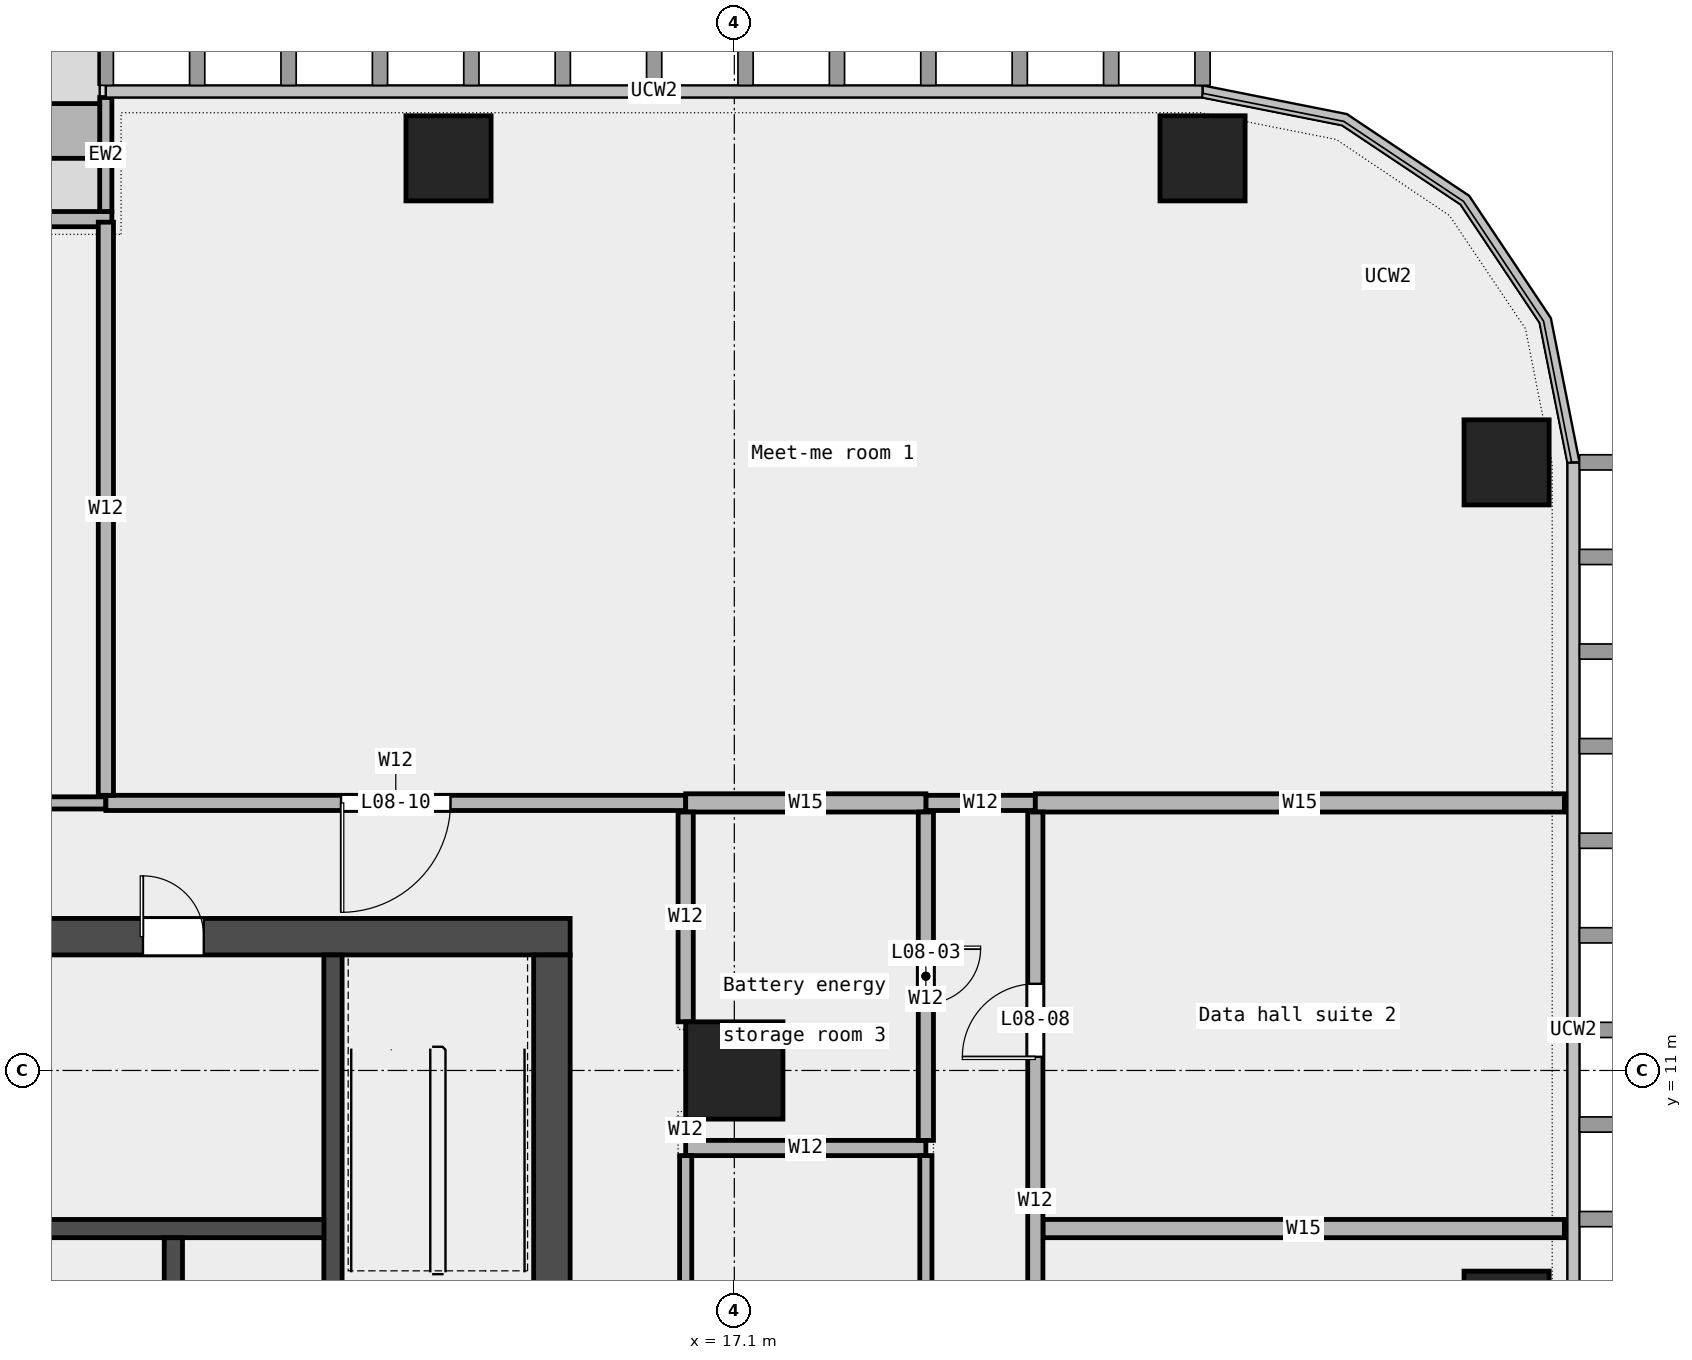
"""IFC4 building model, lengths in metres.
Left out: names, types, materials, properties, quantities, classifications, styles, units other than length and angle.
Written with IfcOpenShell. Run it as: python <this file> out.ifc"""

import sys

from ifc_helpers import new_model, si_unit, direction, frame, frame_2d, origin, origin_2d, place, context, subcontext, project, spatial, rectangle, extrude, element, fill, save


model = new_model("IFC4")
c1 = context("Model", 3, precision=1e-05, world=origin(), true_north=direction((0.0, 1.0)))
c2 = subcontext(c1, "Body", "Model", "MODEL_VIEW")
j1 = project(units=[si_unit("LENGTHUNIT", "METRE"), si_unit("PLANEANGLEUNIT", "RADIAN")], contexts=[c1])
p1 = place(None, origin())
s1 = spatial("IfcSite", under=j1, at=p1, CompositionType="ELEMENT")
p2 = place(p1, origin())
s2 = spatial("IfcBuilding", under=s1, at=p2, CompositionType="ELEMENT")
p3 = place(p2, frame((0.0, 0.0, 45.4)))
s3 = spatial("IfcBuildingStorey", under=s2, at=p3, CompositionType="ELEMENT", Elevation=45.4)
for number, where, z_axis, x_axis in (
    (1, (29.8, 7.0, 0.0), (0.0, 0.0, 1.0), (1.0, 0.0, 0.0)),
    (2, (29.8, 21.0, 0.0), (0.0, 0.0, 1.0), (1.0, 0.0, 0.0)),
    (3, (24.8, 26.0, 0.0), (0.0, 0.0, 1.0), (1.0, 0.0, 0.0)),
    (4, (12.4, 26.0, 0.0), (0.0, 0.0, 1.0), (1.0, 0.0, 0.0)),
):
    element("IfcColumn", number, at=place(p3, frame(where, z_axis=z_axis, x_axis=x_axis)), inside=s3, PredefinedType="COLUMN", context=c2, shape_type="SweptSolid", body=[
        extrude(rectangle(XDim=1.4, YDim=1.4, at=origin_2d()), origin(), (0.0, 0.0, 1.0), 4.35),
    ])
p4 = place(p3, frame((17.1, 11.0, 0.0), z_axis=(0.0, 0.0, 1.0), x_axis=(1.0, 0.0, 0.0)))
e5 = element("IfcColumn", 5, at=p4, inside=s3, PredefinedType="COLUMN", context=c2, shape_type="SweptSolid", body=[
    extrude(rectangle(XDim=1.6, YDim=1.6, at=origin_2d()), origin(), (0.0, 0.0, 1.0), 4.35),
])
p5 = place(p3, frame((6.864, 25.0, 0.0), z_axis=(0.0, 0.0, 1.0), x_axis=(-1.0, 0.0, 0.0)))
e6 = element("IfcWall", 6, at=p5, inside=s3, PredefinedType="STANDARD", context=c2, shape_type="SweptSolid", body=[
    extrude(rectangle(XDim=13.727, YDim=0.25, at=frame_2d((6.864, 0.0))), origin(), (0.0, 0.0, 1.0), 4.35),
])
p6 = place(p5, frame((1.75, 0.0, 0.45)))
e7 = element("IfcOpeningElement", 7, at=p6, cuts=e6, PredefinedType="OPENING", context=c2, shape_type="SweptSolid", body=[
    extrude(rectangle(XDim=1.5, YDim=3.0, at=frame_2d((0.75, 1.5))), frame((0.0, 0.137, 0.0), z_axis=(0.0, -1.0, 0.0), x_axis=(1.0, 0.0, 0.0)), (0.0, 0.0, 1.0), 0.274),
])
p7 = place(p5, frame((4.0, 0.0, 0.0)))
e8 = element("IfcOpeningElement", 8, at=p7, cuts=e6, PredefinedType="OPENING", context=c2, shape_type="SweptSolid", body=[
    extrude(rectangle(XDim=1.8, YDim=2.4, at=frame_2d((0.9, 1.2))), frame((0.0, 0.137, 0.0), z_axis=(0.0, -1.0, 0.0), x_axis=(1.0, 0.0, 0.0)), (0.0, 0.0, 1.0), 0.274),
])
p8 = place(p5, frame((10.5, 0.0, 0.45)))
e9 = element("IfcOpeningElement", 9, at=p8, cuts=e6, PredefinedType="OPENING", context=c2, shape_type="SweptSolid", body=[
    extrude(rectangle(XDim=1.5, YDim=3.0, at=frame_2d((0.75, 1.5))), frame((0.0, 0.137, 0.0), z_axis=(0.0, -1.0, 0.0), x_axis=(1.0, 0.0, 0.0)), (0.0, 0.0, 1.0), 0.274),
])
p9 = place(p3, frame((6.764, 27.0, 0.0), z_axis=(0.0, 0.0, 1.0), x_axis=(0.0, -1.0, 0.0)))
e10 = element("IfcWall", 10, at=p9, inside=s3, PredefinedType="STANDARD", context=c2, shape_type="SweptSolid", body=[
    extrude(rectangle(XDim=1.875, YDim=0.2, at=frame_2d((0.938, 0.0))), origin(), (0.0, 0.0, 1.0), 4.35),
])
p10 = place(p3, frame((6.664, 26.45, 0.0), z_axis=(0.0, 0.0, 1.0), x_axis=(-1.0, 0.0, 0.0)))
e11 = element("IfcWall", 11, at=p10, inside=s3, PredefinedType="STANDARD", context=c2, shape_type="SweptSolid", body=[
    extrude(rectangle(XDim=3.6, YDim=0.9, at=frame_2d((1.8, 0.0))), origin(), (0.0, 0.0, 1.0), 0.7),
])
p11 = place(p3, frame((22.175, 8.4, 0.0), z_axis=(0.0, 0.0, 1.0), x_axis=(1.0, 0.0, 0.0)))
e12 = element("IfcWall", 12, at=p11, inside=s3, PredefinedType="PARTITIONING", context=c2, shape_type="SweptSolid", body=[
    extrude(rectangle(XDim=8.575, YDim=0.3, at=frame_2d((4.288, 0.0))), origin(), (0.0, 0.0, 1.0), 4.35),
])
p12 = place(p3, frame((16.3, 9.725, 0.0), z_axis=(0.0, 0.0, 1.0), x_axis=(1.0, 0.0, 0.0)))
e13 = element("IfcWall", 13, at=p12, inside=s3, PredefinedType="PARTITIONING", context=c2, shape_type="SweptSolid", body=[
    extrude(rectangle(XDim=3.95, YDim=0.25, at=frame_2d((1.975, 0.0))), origin(), (0.0, 0.0, 1.0), 4.35),
])
p13 = place(p3, frame((-6.765, 15.4, 0.0), z_axis=(0.0, 0.0, 1.0), x_axis=(1.0, 0.0, 0.0)))
e14 = element("IfcWall", 14, at=p13, inside=s3, PredefinedType="PARTITIONING", context=c2, shape_type="SweptSolid", body=[
    extrude(rectangle(XDim=13.53, YDim=0.2, at=frame_2d((6.765, 0.0))), origin(), (0.0, 0.0, 1.0), 4.35),
])
p14 = place(p13, frame((6.015, 0.0, 0.0)))
e15 = element("IfcOpeningElement", 15, at=p14, cuts=e14, PredefinedType="OPENING", context=c2, shape_type="SweptSolid", body=[
    extrude(rectangle(XDim=1.5, YDim=2.1, at=frame_2d((0.75, 1.05))), frame((0.0, 0.112, 0.0), z_axis=(0.0, -1.0, 0.0), x_axis=(1.0, 0.0, 0.0)), (0.0, 0.0, 1.0), 0.224),
])
p15 = place(p3, frame((6.765, 15.4, 0.0), z_axis=(0.0, 0.0, 1.0), x_axis=(1.0, 0.0, 0.0)))
e16 = element("IfcWall", 16, at=p15, inside=s3, PredefinedType="PARTITIONING", context=c2, shape_type="SweptSolid", body=[
    extrude(rectangle(XDim=9.535, YDim=0.25, at=frame_2d((4.768, 0.0))), origin(), (0.0, 0.0, 1.0), 4.35),
])
p16 = place(p15, frame((3.867, 0.0, 0.0)))
e17 = element("IfcOpeningElement", 17, at=p16, cuts=e16, PredefinedType="OPENING", context=c2, shape_type="SweptSolid", body=[
    extrude(rectangle(XDim=1.8, YDim=2.1, at=frame_2d((0.9, 1.05))), frame((0.0, 0.137, 0.0), z_axis=(0.0, -1.0, 0.0), x_axis=(1.0, 0.0, 0.0)), (0.0, 0.0, 1.0), 0.274),
])
p17 = place(p3, frame((20.25, 15.4, 0.0), z_axis=(0.0, 0.0, 1.0), x_axis=(1.0, 0.0, 0.0)))
e18 = element("IfcWall", 18, at=p17, inside=s3, PredefinedType="PARTITIONING", context=c2, shape_type="SweptSolid", body=[
    extrude(rectangle(XDim=1.8, YDim=0.25, at=frame_2d((0.9, 0.0))), origin(), (0.0, 0.0, 1.0), 4.35),
])
p18 = place(p3, frame((16.3, 15.4, 0.0), z_axis=(0.0, 0.0, 1.0), x_axis=(1.0, 0.0, 0.0)))
e19 = element("IfcWall", 19, at=p18, inside=s3, PredefinedType="PARTITIONING", context=c2, shape_type="SweptSolid", body=[
    extrude(rectangle(XDim=3.95, YDim=0.3, at=frame_2d((1.975, 0.0))), origin(), (0.0, 0.0, 1.0), 4.35),
])
p19 = place(p3, frame((22.05, 15.4, 0.0), z_axis=(0.0, 0.0, 1.0), x_axis=(1.0, 0.0, 0.0)))
e20 = element("IfcWall", 20, at=p19, inside=s3, PredefinedType="PARTITIONING", context=c2, shape_type="SweptSolid", body=[
    extrude(rectangle(XDim=8.7, YDim=0.3, at=frame_2d((4.35, 0.0))), origin(), (0.0, 0.0, 1.0), 4.35),
])
p20 = place(p3, frame((6.765, 15.525, 0.0), z_axis=(0.0, 0.0, 1.0), x_axis=(0.0, 1.0, 0.0)))
e21 = element("IfcWall", 21, at=p20, inside=s3, PredefinedType="PARTITIONING", context=c2, shape_type="SweptSolid", body=[
    extrude(rectangle(XDim=9.425, YDim=0.25, at=frame_2d((4.712, 0.0))), origin(), (0.0, 0.0, 1.0), 4.35),
])
p21 = place(p3, frame((16.3, 4.15, 0.0), z_axis=(0.0, 0.0, 1.0), x_axis=(0.0, 1.0, 0.0)))
e22 = element("IfcWall", 22, at=p21, inside=s3, PredefinedType="PARTITIONING", context=c2, shape_type="SweptSolid", body=[
    extrude(rectangle(XDim=5.45, YDim=0.2, at=frame_2d((2.725, 0.0))), origin(), (0.0, 0.0, 1.0), 4.35),
])
p22 = place(p3, frame((16.3, 9.85, 0.0), z_axis=(0.0, 0.0, 1.0), x_axis=(0.0, 1.0, 0.0)))
e23 = element("IfcWall", 23, at=p22, inside=s3, PredefinedType="PARTITIONING", context=c2, shape_type="SweptSolid", body=[
    extrude(rectangle(XDim=0.35, YDim=0.25, at=frame_2d((0.175, 0.0))), origin(), (0.0, 0.0, 1.0), 4.35),
])
p23 = place(p3, frame((16.3, 11.8, 0.0), z_axis=(0.0, 0.0, 1.0), x_axis=(0.0, 1.0, 0.0)))
e24 = element("IfcWall", 24, at=p23, inside=s3, PredefinedType="PARTITIONING", context=c2, shape_type="SweptSolid", body=[
    extrude(rectangle(XDim=3.45, YDim=0.25, at=frame_2d((1.725, 0.0))), origin(), (0.0, 0.0, 1.0), 4.35),
])
p24 = place(p3, frame((20.25, 4.15, 0.0), z_axis=(0.0, 0.0, 1.0), x_axis=(0.0, 1.0, 0.0)))
e25 = element("IfcWall", 25, at=p24, inside=s3, PredefinedType="PARTITIONING", context=c2, shape_type="SweptSolid", body=[
    extrude(rectangle(XDim=5.45, YDim=0.2, at=frame_2d((2.725, 0.0))), origin(), (0.0, 0.0, 1.0), 4.35),
])
p25 = place(p24, frame((2.275, 0.0, 0.0)))
e26 = element("IfcOpeningElement", 26, at=p25, cuts=e25, PredefinedType="OPENING", context=c2, shape_type="SweptSolid", body=[
    extrude(rectangle(XDim=0.9, YDim=2.1, at=frame_2d((0.45, 1.05))), frame((0.0, 0.112, 0.0), z_axis=(0.0, -1.0, 0.0), x_axis=(1.0, 0.0, 0.0)), (0.0, 0.0, 1.0), 0.224),
])
p26 = place(p3, frame((20.25, 9.85, 0.0), z_axis=(0.0, 0.0, 1.0), x_axis=(0.0, 1.0, 0.0)))
e27 = element("IfcWall", 27, at=p26, inside=s3, PredefinedType="PARTITIONING", context=c2, shape_type="SweptSolid", body=[
    extrude(rectangle(XDim=5.4, YDim=0.25, at=frame_2d((2.7, 0.0))), origin(), (0.0, 0.0, 1.0), 4.35),
])
p27 = place(p26, frame((2.25, 0.0, 0.0)))
e28 = element("IfcOpeningElement", 28, at=p27, cuts=e27, PredefinedType="OPENING", context=c2, shape_type="SweptSolid", body=[
    extrude(rectangle(XDim=0.9, YDim=2.1, at=frame_2d((0.45, 1.05))), frame((0.0, 0.137, 0.0), z_axis=(0.0, -1.0, 0.0), x_axis=(1.0, 0.0, 0.0)), (0.0, 0.0, 1.0), 0.274),
])
p28 = place(p3, frame((22.05, 2.46, 0.0), z_axis=(0.0, 0.0, 1.0), x_axis=(0.0, 1.0, 0.0)))
e29 = element("IfcWall", 29, at=p28, inside=s3, PredefinedType="PARTITIONING", context=c2, shape_type="SweptSolid", body=[
    extrude(rectangle(XDim=12.79, YDim=0.25, at=frame_2d((6.395, 0.0))), origin(), (0.0, 0.0, 1.0), 4.35),
])
p29 = place(p28, frame((2.37, 0.0, 0.0)))
e30 = element("IfcOpeningElement", 30, at=p29, cuts=e29, PredefinedType="OPENING", context=c2, shape_type="SweptSolid", body=[
    extrude(rectangle(XDim=1.2, YDim=2.1, at=frame_2d((0.6, 1.05))), frame((0.0, 0.137, 0.0), z_axis=(0.0, -1.0, 0.0), x_axis=(1.0, 0.0, 0.0)), (0.0, 0.0, 1.0), 0.274),
])
p30 = place(p28, frame((8.765, 0.0, 0.0)))
e31 = element("IfcOpeningElement", 31, at=p30, cuts=e29, PredefinedType="OPENING", context=c2, shape_type="SweptSolid", body=[
    extrude(rectangle(XDim=1.2, YDim=2.1, at=frame_2d((0.6, 1.05))), frame((0.0, 0.137, 0.0), z_axis=(0.0, -1.0, 0.0), x_axis=(1.0, 0.0, 0.0)), (0.0, 0.0, 1.0), 0.274),
])
p31 = place(p3, frame((-14.4, 13.2, 0.0), z_axis=(0.0, 0.0, 1.0), x_axis=(1.0, 0.0, 0.0)))
e32 = element("IfcWall", 32, at=p31, inside=s3, PredefinedType="SHEAR", context=c2, shape_type="SweptSolid", body=[
    extrude(rectangle(XDim=28.8, YDim=0.6, at=frame_2d((14.4, 0.0))), origin(), (0.0, 0.0, 1.0), 4.5),
])
p32 = place(p31, frame((4.9, 0.0, 0.0)))
e33 = element("IfcOpeningElement", 33, at=p32, cuts=e32, PredefinedType="OPENING", context=c2, shape_type="SweptSolid", body=[
    extrude(rectangle(XDim=1.0, YDim=2.1, at=frame_2d((0.5, 1.05))), frame((0.0, 0.312, 0.0), z_axis=(0.0, -1.0, 0.0), x_axis=(1.0, 0.0, 0.0)), (0.0, 0.0, 1.0), 0.624),
])
p33 = place(p31, frame((9.025, 0.0, 0.0)))
e34 = element("IfcOpeningElement", 34, at=p33, cuts=e32, PredefinedType="OPENING", context=c2, shape_type="SweptSolid", body=[
    extrude(rectangle(XDim=1.0, YDim=2.1, at=frame_2d((0.5, 1.05))), frame((0.0, 0.312, 0.0), z_axis=(0.0, -1.0, 0.0), x_axis=(1.0, 0.0, 0.0)), (0.0, 0.0, 1.0), 0.624),
])
p34 = place(p31, frame((13.337, 0.0, 0.0)))
e35 = element("IfcOpeningElement", 35, at=p34, cuts=e32, PredefinedType="OPENING", context=c2, shape_type="SweptSolid", body=[
    extrude(rectangle(XDim=1.0, YDim=2.1, at=frame_2d((0.5, 1.05))), frame((0.0, 0.312, 0.0), z_axis=(0.0, -1.0, 0.0), x_axis=(1.0, 0.0, 0.0)), (0.0, 0.0, 1.0), 0.624),
])
p35 = place(p31, frame((17.087, 0.0, 0.0)))
e36 = element("IfcOpeningElement", 36, at=p35, cuts=e32, PredefinedType="OPENING", context=c2, shape_type="SweptSolid", body=[
    extrude(rectangle(XDim=1.0, YDim=2.1, at=frame_2d((0.5, 1.05))), frame((0.0, 0.312, 0.0), z_axis=(0.0, -1.0, 0.0), x_axis=(1.0, 0.0, 0.0)), (0.0, 0.0, 1.0), 0.624),
])
p36 = place(p31, frame((21.775, 0.0, 0.0)))
e37 = element("IfcOpeningElement", 37, at=p36, cuts=e32, PredefinedType="OPENING", context=c2, shape_type="SweptSolid", body=[
    extrude(rectangle(XDim=1.0, YDim=2.1, at=frame_2d((0.5, 1.05))), frame((0.0, 0.312, 0.0), z_axis=(0.0, -1.0, 0.0), x_axis=(1.0, 0.0, 0.0)), (0.0, 0.0, 1.0), 0.624),
])
p37 = place(p3, frame((14.1, -6.6, 0.0), z_axis=(0.0, 0.0, 1.0), x_axis=(0.0, 1.0, 0.0)))
e38 = element("IfcWall", 38, at=p37, inside=s3, PredefinedType="SHEAR", context=c2, shape_type="SweptSolid", body=[
    extrude(rectangle(XDim=19.5, YDim=0.6, at=frame_2d((9.75, 0.0))), origin(), (0.0, 0.0, 1.0), 4.5),
])
p38 = place(p37, frame((9.3, 0.0, 0.0)))
e39 = element("IfcOpeningElement", 39, at=p38, cuts=e38, PredefinedType="OPENING", context=c2, shape_type="SweptSolid", body=[
    extrude(rectangle(XDim=1.8, YDim=2.1, at=frame_2d((0.9, 1.05))), frame((0.0, 0.312, 0.0), z_axis=(0.0, -1.0, 0.0), x_axis=(1.0, 0.0, 0.0)), (0.0, 0.0, 1.0), 0.624),
])
p39 = place(p3, frame((10.5, 5.25, 0.0), z_axis=(0.0, 0.0, 1.0), x_axis=(0.0, 1.0, 0.0)))
e40 = element("IfcWall", 40, at=p39, inside=s3, PredefinedType="SHEAR", context=c2, shape_type="SweptSolid", body=[
    extrude(rectangle(XDim=7.65, YDim=0.3, at=frame_2d((3.825, 0.0))), origin(), (0.0, 0.0, 1.0), 4.5),
])
p40 = place(p3, frame((-10.35, 8.4, 0.0), z_axis=(0.0, 0.0, 1.0), x_axis=(1.0, 0.0, 0.0)))
e41 = element("IfcWall", 41, at=p40, inside=s3, PredefinedType="SOLIDWALL", context=c2, shape_type="SweptSolid", body=[
    extrude(rectangle(XDim=20.7, YDim=0.3, at=frame_2d((10.35, 0.0))), origin(), (0.0, 0.0, 1.0), 4.5),
])
p41 = place(p3, frame((7.875, 5.55, 0.0), z_axis=(0.0, 0.0, 1.0), x_axis=(0.0, 1.0, 0.0)))
e42 = element("IfcWall", 42, at=p41, inside=s3, PredefinedType="SOLIDWALL", context=c2, shape_type="SweptSolid", body=[
    extrude(rectangle(XDim=2.7, YDim=0.3, at=frame_2d((1.35, 0.0))), origin(), (0.0, 0.0, 1.0), 4.5),
])
p42 = place(p27, origin())
e43 = element("IfcDoor", 43, at=p42, inside=s3, OperationType="SINGLE_SWING_LEFT", PredefinedType="DOOR", context=c2, shape_type="SweptSolid", body=[
    extrude(rectangle(XDim=0.9, YDim=2.1, at=frame_2d((0.45, 1.05))), frame((0.0, 0.025, 0.0), z_axis=(0.0, -1.0, 0.0), x_axis=(1.0, 0.0, 0.0)), (0.0, 0.0, 1.0), 0.05),
])
fill(e28, e43)
p43 = place(p30, origin())
e44 = element("IfcDoor", 44, at=p43, inside=s3, OperationType="SINGLE_SWING_LEFT", PredefinedType="DOOR", context=c2, shape_type="SweptSolid", body=[
    extrude(rectangle(XDim=1.2, YDim=2.1, at=frame_2d((0.6, 1.05))), frame((0.0, 0.025, 0.0), z_axis=(0.0, -1.0, 0.0), x_axis=(1.0, 0.0, 0.0)), (0.0, 0.0, 1.0), 0.05),
])
fill(e31, e44)
p44 = place(p16, origin())
e45 = element("IfcDoor", 45, at=p44, inside=s3, OperationType="DOUBLE_DOOR_SINGLE_SWING", PredefinedType="DOOR", context=c2, shape_type="SweptSolid", body=[
    extrude(rectangle(XDim=1.8, YDim=2.1, at=frame_2d((0.9, 1.05))), frame((0.0, 0.025, 0.0), z_axis=(0.0, -1.0, 0.0), x_axis=(1.0, 0.0, 0.0)), (0.0, 0.0, 1.0), 0.05),
])
fill(e17, e45)
p45 = place(p36, origin())
e46 = element("IfcDoor", 46, at=p45, inside=s3, OperationType="SINGLE_SWING_LEFT", PredefinedType="DOOR", context=c2, shape_type="SweptSolid", body=[
    extrude(rectangle(XDim=1.0, YDim=2.1, at=frame_2d((0.5, 1.05))), frame((0.0, 0.025, 0.0), z_axis=(0.0, -1.0, 0.0), x_axis=(1.0, 0.0, 0.0)), (0.0, 0.0, 1.0), 0.05),
])
fill(e37, e46)
save(model, sys.argv[1])
